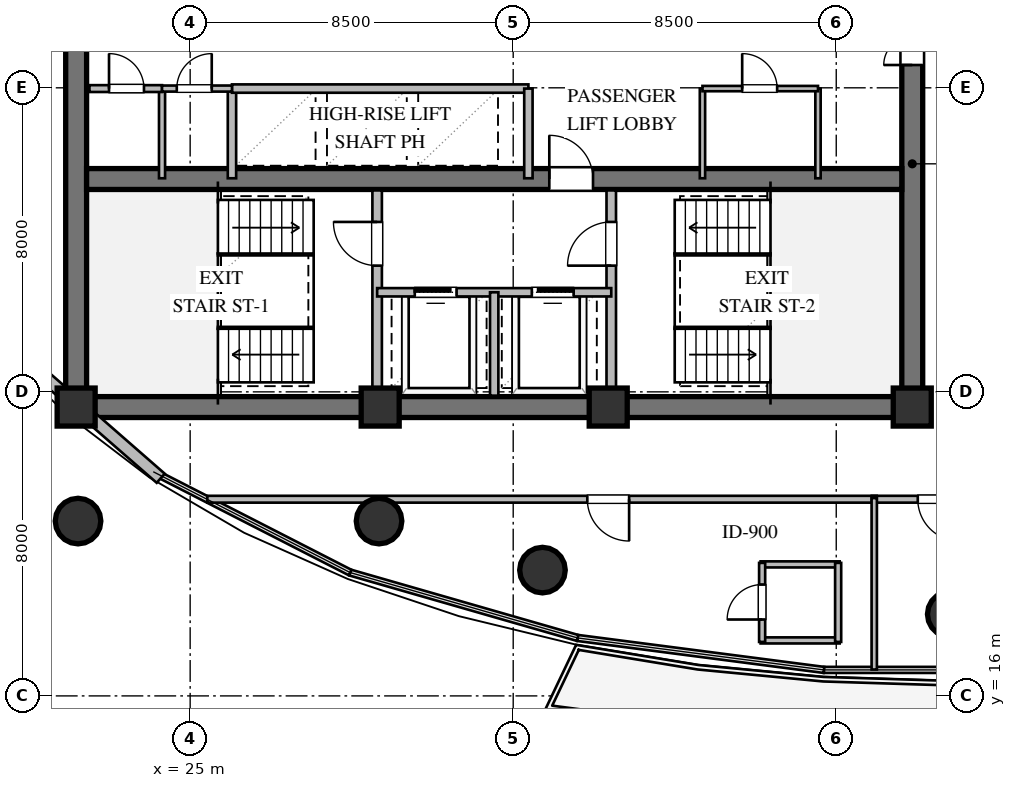
"""IFC4 building model, lengths in metres.
Left out: names, types, materials, properties, quantities, classifications, styles, units other than length and angle.
Written with IfcOpenShell. Run it as: python <this file> out.ifc"""

import sys

from ifc_helpers import new_model, si_unit, direction, frame, frame_2d, origin, origin_2d, place, context, subcontext, project, spatial, rectangle, circle, extrude, element, fill, save


model = new_model("IFC4")
c1 = context("Model", 3, precision=1e-05, world=origin(), true_north=direction((0.0, 1.0)))
c2 = subcontext(c1, "Body", "Model", "MODEL_VIEW")
j1 = project(units=[si_unit("LENGTHUNIT", "METRE"), si_unit("PLANEANGLEUNIT", "RADIAN")], contexts=[c1])
p1 = place(None, origin())
s1 = spatial("IfcSite", under=j1, at=p1, CompositionType="ELEMENT")
p2 = place(p1, origin())
s2 = spatial("IfcBuilding", under=s1, at=p2, CompositionType="ELEMENT")
p3 = place(p2, frame((0.0, 0.0, 124.2)))
s3 = spatial("IfcBuildingStorey", under=s2, at=p3, CompositionType="ELEMENT", Elevation=124.2)
p4 = place(p3, frame((21.725, 23.6, 0.0), z_axis=(0.0, 0.0, 1.0), x_axis=(1.0, 0.0, 0.0)))
e1 = element("IfcWall", 1, at=p4, inside=s3, PredefinedType="SHEAR", context=c2, shape_type="SweptSolid", body=[
    extrude(rectangle(XDim=22.55, YDim=0.55, at=frame_2d((11.275, 0.0))), origin(), (0.0, 0.0, 1.0), 3.36),
])
p5 = place(p3, frame((22.0, 23.875, 0.0), z_axis=(0.0, 0.0, 1.0), x_axis=(0.0, 1.0, 0.0)))
e2 = element("IfcWall", 2, at=p5, inside=s3, PredefinedType="SHEAR", context=c2, shape_type="SweptSolid", body=[
    extrude(rectangle(XDim=12.25, YDim=0.55, at=frame_2d((6.125, 0.0))), origin(), (0.0, 0.0, 1.0), 3.36),
])
p6 = place(p3, frame((44.0, 23.875, 0.0), z_axis=(0.0, 0.0, 1.0), x_axis=(0.0, 1.0, 0.0)))
e3 = element("IfcWall", 3, at=p6, inside=s3, PredefinedType="SHEAR", context=c2, shape_type="SweptSolid", body=[
    extrude(rectangle(XDim=12.25, YDim=0.55, at=frame_2d((6.125, 0.0))), origin(), (0.0, 0.0, 1.0), 3.36),
])
p7 = place(p6, frame((8.725, 0.0, 0.0)))
e4 = element("IfcOpeningElement", 4, at=p7, cuts=e3, PredefinedType="OPENING", context=c2, shape_type="SweptSolid", body=[
    extrude(rectangle(XDim=1.5, YDim=2.15, at=frame_2d((0.75, 1.075))), frame((0.0, 0.285, 0.0), z_axis=(0.0, -1.0, 0.0), x_axis=(1.0, 0.0, 0.0)), (0.0, 0.0, 1.0), 0.57),
])
p8 = place(p3, frame((22.275, 29.6, 0.0), z_axis=(0.0, 0.0, 1.0), x_axis=(1.0, 0.0, 0.0)))
e5 = element("IfcWall", 5, at=p8, inside=s3, PredefinedType="SHEAR", context=c2, shape_type="SweptSolid", body=[
    extrude(rectangle(XDim=21.45, YDim=0.55, at=frame_2d((10.725, 0.0))), origin(), (0.0, 0.0, 1.0), 3.36),
])
p9 = place(p8, frame((12.175, 0.0, 0.0)))
e6 = element("IfcOpeningElement", 6, at=p9, cuts=e5, PredefinedType="OPENING", context=c2, shape_type="SweptSolid", body=[
    extrude(rectangle(XDim=1.15, YDim=2.1, at=frame_2d((0.575, 1.05))), frame((0.0, 0.285, 0.0), z_axis=(0.0, -1.0, 0.0), x_axis=(1.0, 0.0, 0.0)), (0.0, 0.0, 1.0), 0.57),
])
for number, where, z_axis, x_axis in (
    (7, (22.0, 23.6, 0.0), (0.0, 0.0, 1.0), (1.0, 0.0, 0.0)),
    (8, (30.0, 23.6, 0.0), (0.0, 0.0, 1.0), (1.0, 0.0, 0.0)),
    (9, (36.0, 23.6, 0.0), (0.0, 0.0, 1.0), (1.0, 0.0, 0.0)),
    (10, (44.0, 23.6, 0.0), (0.0, 0.0, 1.0), (1.0, 0.0, 0.0)),
):
    element("IfcColumn", number, at=place(p3, frame(where, z_axis=z_axis, x_axis=x_axis)), inside=s3, PredefinedType="COLUMN", context=c2, shape_type="SweptSolid", body=[
        extrude(rectangle(XDim=1.0, YDim=1.0, at=origin_2d()), origin(), (0.0, 0.0, 1.0), 3.6),
    ])
for number, where, z_axis, x_axis in (
    (11, (22.05, 20.6, 0.0), (0.0, 0.0, 1.0), (1.0, 0.0, 0.0)),
    (12, (29.97, 20.6, 0.0), (0.0, 0.0, 1.0), (1.0, 0.0, 0.0)),
    (13, (34.27, 19.31, 0.0), (0.0, 0.0, 1.0), (1.0, 0.0, 0.0)),
    (14, (45.0, 18.15, 0.0), (0.0, 0.0, 1.0), (1.0, 0.0, 0.0)),
):
    element("IfcColumn", number, at=place(p3, frame(where, z_axis=z_axis, x_axis=x_axis)), inside=s3, PredefinedType="COLUMN", context=c2, shape_type="SweptSolid", body=[
        extrude(circle(Radius=0.6, at=origin_2d()), origin(), (0.0, 0.0, 1.0), 3.6),
    ])
p10 = place(p3, frame((24.225, 21.727, 0.0), z_axis=(0.0, 0.0, 1.0), x_axis=(-0.753105964003, 0.657899237713, 0.0)))
e15 = element("IfcWall", 15, at=p10, inside=s3, PredefinedType="STANDARD", context=c2, shape_type="SweptSolid", body=[
    extrude(rectangle(XDim=5.998, YDim=0.32, at=frame_2d((2.999, 0.0))), origin(), (0.0, 0.0, 1.0), 2.35),
])
p11 = place(p3, frame((29.92, 23.9, 0.0), z_axis=(0.0, 0.0, 1.0), x_axis=(0.0, 1.0, 0.0)))
e16 = element("IfcWall", 16, at=p11, inside=s3, PredefinedType="SOLIDWALL", context=c2, shape_type="SweptSolid", body=[
    extrude(rectangle(XDim=5.4, YDim=0.25, at=frame_2d((2.7, 0.0))), origin(), (0.0, 0.0, 1.0), 2.806),
])
p12 = place(p11, frame((3.421, 0.0, 0.0)))
e17 = element("IfcOpeningElement", 17, at=p12, cuts=e16, PredefinedType="OPENING", context=c2, shape_type="SweptSolid", body=[
    extrude(rectangle(XDim=1.15, YDim=2.1, at=frame_2d((0.575, 1.05))), frame((0.0, 0.135, 0.0), z_axis=(0.0, -1.0, 0.0), x_axis=(1.0, 0.0, 0.0)), (0.0, 0.0, 1.0), 0.27),
])
p13 = place(p3, frame((36.08, 23.9, 0.0), z_axis=(0.0, 0.0, 1.0), x_axis=(0.0, 1.0, 0.0)))
e18 = element("IfcWall", 18, at=p13, inside=s3, PredefinedType="SOLIDWALL", context=c2, shape_type="SweptSolid", body=[
    extrude(rectangle(XDim=5.4, YDim=0.25, at=frame_2d((2.7, 0.0))), origin(), (0.0, 0.0, 1.0), 3.36),
])
p14 = place(p13, frame((3.421, 0.0, 0.0)))
e19 = element("IfcOpeningElement", 19, at=p14, cuts=e18, PredefinedType="OPENING", context=c2, shape_type="SweptSolid", body=[
    extrude(rectangle(XDim=1.15, YDim=2.1, at=frame_2d((0.575, 1.05))), frame((0.0, 0.135, 0.0), z_axis=(0.0, -1.0, 0.0), x_axis=(1.0, 0.0, 0.0)), (0.0, 0.0, 1.0), 0.27),
])
p15 = place(p3, frame((29.92, 26.62, 0.0), z_axis=(0.0, 0.0, 1.0), x_axis=(1.0, 0.0, 0.0)))
e20 = element("IfcWall", 20, at=p15, inside=s3, PredefinedType="SOLIDWALL", context=c2, shape_type="SweptSolid", body=[
    extrude(rectangle(XDim=6.16, YDim=0.22, at=frame_2d((3.08, 0.0))), origin(), (0.0, 0.0, 1.0), 3.36),
])
p16 = place(p15, frame((0.99, 0.0, 0.0)))
e21 = element("IfcOpeningElement", 21, at=p16, cuts=e20, PredefinedType="OPENING", context=c2, shape_type="SweptSolid", body=[
    extrude(rectangle(XDim=1.1, YDim=2.1, at=frame_2d((0.55, 1.05))), frame((0.0, 0.12, 0.0), z_axis=(0.0, -1.0, 0.0), x_axis=(1.0, 0.0, 0.0)), (0.0, 0.0, 1.0), 0.24),
])
p17 = place(p15, frame((4.07, 0.0, 0.0)))
e22 = element("IfcOpeningElement", 22, at=p17, cuts=e20, PredefinedType="OPENING", context=c2, shape_type="SweptSolid", body=[
    extrude(rectangle(XDim=1.1, YDim=2.1, at=frame_2d((0.55, 1.05))), frame((0.0, 0.12, 0.0), z_axis=(0.0, -1.0, 0.0), x_axis=(1.0, 0.0, 0.0)), (0.0, 0.0, 1.0), 0.24),
])
p18 = place(p3, frame((33.0, 23.9, 0.0), z_axis=(0.0, 0.0, 1.0), x_axis=(0.0, 1.0, 0.0)))
e23 = element("IfcWall", 23, at=p18, inside=s3, PredefinedType="SOLIDWALL", context=c2, shape_type="SweptSolid", body=[
    extrude(rectangle(XDim=2.72, YDim=0.22, at=frame_2d((1.36, 0.0))), origin(), (0.0, 0.0, 1.0), 3.36),
])
p19 = place(p3, frame((26.1, 29.62, 0.0), z_axis=(0.0, 0.0, 1.0), x_axis=(0.0, 1.0, 0.0)))
e24 = element("IfcWall", 24, at=p19, inside=s3, PredefinedType="SOLIDWALL", context=c2, shape_type="SweptSolid", body=[
    extrude(rectangle(XDim=2.36, YDim=0.22, at=frame_2d((1.18, 0.0))), origin(), (0.0, 0.0, 1.0), 3.36),
])
p20 = place(p3, frame((26.1, 31.98, 0.0), z_axis=(0.0, 0.0, 1.0), x_axis=(1.0, 0.0, 0.0)))
e25 = element("IfcWall", 25, at=p20, inside=s3, PredefinedType="SOLIDWALL", context=c2, shape_type="SweptSolid", body=[
    extrude(rectangle(XDim=7.8, YDim=0.22, at=frame_2d((3.9, 0.0))), origin(), (0.0, 0.0, 1.0), 3.36),
])
p21 = place(p3, frame((33.9, 29.62, 0.0), z_axis=(0.0, 0.0, 1.0), x_axis=(0.0, 1.0, 0.0)))
e26 = element("IfcWall", 26, at=p21, inside=s3, PredefinedType="SOLIDWALL", context=c2, shape_type="SweptSolid", body=[
    extrude(rectangle(XDim=2.36, YDim=0.22, at=frame_2d((1.18, 0.0))), origin(), (0.0, 0.0, 1.0), 3.36),
])
p22 = place(p3, frame((24.26, 29.62, 0.0), z_axis=(0.0, 0.0, 1.0), x_axis=(0.0, 1.0, 0.0)))
e27 = element("IfcWall", 27, at=p22, inside=s3, PredefinedType="PLUMBINGWALL", context=c2, shape_type="SweptSolid", body=[
    extrude(rectangle(XDim=2.36, YDim=0.16, at=frame_2d((1.18, 0.0))), origin(), (0.0, 0.0, 1.0), 3.36),
])
p23 = place(p3, frame((22.35, 31.98, 0.0), z_axis=(0.0, 0.0, 1.0), x_axis=(1.0, 0.0, 0.0)))
e28 = element("IfcWall", 28, at=p23, inside=s3, PredefinedType="PARTITIONING", context=c2, shape_type="SweptSolid", body=[
    extrude(rectangle(XDim=1.91, YDim=0.18, at=frame_2d((0.955, 0.0))), origin(), (0.0, 0.0, 1.0), 3.36),
])
p24 = place(p23, frame((0.515, 0.0, 0.0)))
e29 = element("IfcOpeningElement", 29, at=p24, cuts=e28, PredefinedType="OPENING", context=c2, shape_type="SweptSolid", body=[
    extrude(rectangle(XDim=0.92, YDim=2.1, at=frame_2d((0.46, 1.05))), frame((0.0, 0.1, 0.0), z_axis=(0.0, -1.0, 0.0), x_axis=(1.0, 0.0, 0.0)), (0.0, 0.0, 1.0), 0.2),
])
p25 = place(p3, frame((24.26, 31.98, 0.0), z_axis=(0.0, 0.0, 1.0), x_axis=(1.0, 0.0, 0.0)))
e30 = element("IfcWall", 30, at=p25, inside=s3, PredefinedType="PLUMBINGWALL", context=c2, shape_type="SweptSolid", body=[
    extrude(rectangle(XDim=1.84, YDim=0.16, at=frame_2d((0.92, 0.0))), origin(), (0.0, 0.0, 1.0), 3.36),
])
p26 = place(p25, frame((0.388, 0.0, 0.0)))
e31 = element("IfcOpeningElement", 31, at=p26, cuts=e30, PredefinedType="OPENING", context=c2, shape_type="SweptSolid", body=[
    extrude(rectangle(XDim=0.92, YDim=2.1, at=frame_2d((0.46, 1.05))), frame((0.0, 0.09, 0.0), z_axis=(0.0, -1.0, 0.0), x_axis=(1.0, 0.0, 0.0)), (0.0, 0.0, 1.0), 0.18),
])
for number, where, z_axis, x_axis in (
    (32, (38.48, 29.62, 0.0), (0.0, 0.0, 1.0), (0.0, 1.0, 0.0)),
    (33, (41.52, 29.62, 0.0), (0.0, 0.0, 1.0), (0.0, 1.0, 0.0)),
):
    element("IfcWall", number, at=place(p3, frame(where, z_axis=z_axis, x_axis=x_axis)), inside=s3, PredefinedType="PARTITIONING", context=c2, shape_type="SweptSolid", body=[
        extrude(rectangle(XDim=2.36, YDim=0.14, at=frame_2d((1.18, 0.0))), origin(), (0.0, 0.0, 1.0), 3.36),
    ])
p27 = place(p3, frame((38.48, 31.98, 0.0), z_axis=(0.0, 0.0, 1.0), x_axis=(1.0, 0.0, 0.0)))
e34 = element("IfcWall", 34, at=p27, inside=s3, PredefinedType="PARTITIONING", context=c2, shape_type="SweptSolid", body=[
    extrude(rectangle(XDim=3.04, YDim=0.14, at=frame_2d((1.52, 0.0))), origin(), (0.0, 0.0, 1.0), 3.36),
])
p28 = place(p27, frame((1.045, 0.0, 0.0)))
e35 = element("IfcOpeningElement", 35, at=p28, cuts=e34, PredefinedType="OPENING", context=c2, shape_type="SweptSolid", body=[
    extrude(rectangle(XDim=0.92, YDim=2.1, at=frame_2d((0.46, 1.05))), frame((0.0, 0.08, 0.0), z_axis=(0.0, -1.0, 0.0), x_axis=(1.0, 0.0, 0.0)), (0.0, 0.0, 1.0), 0.16),
])
for number, where, z_axis, x_axis in (
    (36, (40.01, 17.46, 0.0), (0.0, 0.0, 1.0), (1.0, 0.0, 0.0)),
    (37, (40.01, 19.46, 0.0), (0.0, 0.0, 1.0), (1.0, 0.0, 0.0)),
):
    element("IfcWall", number, at=place(p3, frame(where, z_axis=z_axis, x_axis=x_axis)), inside=s3, PredefinedType="PLUMBINGWALL", context=c2, shape_type="SweptSolid", body=[
        extrude(rectangle(XDim=2.08, YDim=0.16, at=frame_2d((1.04, 0.0))), origin(), (0.0, 0.0, 1.0), 3.36),
    ])
p29 = place(p3, frame((40.05, 17.42, 0.0), z_axis=(0.0, 0.0, 1.0), x_axis=(0.0, 1.0, 0.0)))
e38 = element("IfcWall", 38, at=p29, inside=s3, PredefinedType="PLUMBINGWALL", context=c2, shape_type="SweptSolid", body=[
    extrude(rectangle(XDim=2.08, YDim=0.16, at=frame_2d((1.04, 0.0))), origin(), (0.0, 0.0, 1.0), 3.36),
])
p30 = place(p29, frame((0.59, 0.0, 0.0)))
e39 = element("IfcOpeningElement", 39, at=p30, cuts=e38, PredefinedType="OPENING", context=c2, shape_type="SweptSolid", body=[
    extrude(rectangle(XDim=0.92, YDim=2.1, at=frame_2d((0.46, 1.05))), frame((0.0, 0.09, 0.0), z_axis=(0.0, -1.0, 0.0), x_axis=(1.0, 0.0, 0.0)), (0.0, 0.0, 1.0), 0.18),
])
p31 = place(p3, frame((42.05, 17.42, 0.0), z_axis=(0.0, 0.0, 1.0), x_axis=(0.0, 1.0, 0.0)))
e40 = element("IfcWall", 40, at=p31, inside=s3, PredefinedType="PLUMBINGWALL", context=c2, shape_type="SweptSolid", body=[
    extrude(rectangle(XDim=2.08, YDim=0.16, at=frame_2d((1.04, 0.0))), origin(), (0.0, 0.0, 1.0), 3.36),
])
p32 = place(p3, frame((43.065, 21.175, 0.0), z_axis=(0.0, 0.0, 1.0), x_axis=(-1.0, 0.0, 0.0)))
e41 = element("IfcWall", 41, at=p32, inside=s3, PredefinedType="PARTITIONING", context=c2, shape_type="SweptSolid", body=[
    extrude(rectangle(XDim=17.614, YDim=0.18, at=frame_2d((8.807, 0.0))), origin(), (0.0, 0.0, 1.0), 2.657),
])
p33 = place(p32, frame((6.515, 0.0, 0.0)))
e42 = element("IfcOpeningElement", 42, at=p33, cuts=e41, PredefinedType="OPENING", context=c2, shape_type="SweptSolid", body=[
    extrude(rectangle(XDim=1.1, YDim=2.1, at=frame_2d((0.55, 1.05))), frame((0.0, 0.1, 0.0), z_axis=(0.0, -1.0, 0.0), x_axis=(1.0, 0.0, 0.0)), (0.0, 0.0, 1.0), 0.2),
])
p34 = place(p3, frame((46.455, 21.175, 0.0), z_axis=(0.0, 0.0, 1.0), x_axis=(-1.0, 0.0, 0.0)))
e43 = element("IfcWall", 43, at=p34, inside=s3, PredefinedType="PARTITIONING", context=c2, shape_type="SweptSolid", body=[
    extrude(rectangle(XDim=3.52, YDim=0.18, at=frame_2d((1.76, 0.0))), origin(), (0.0, 0.0, 1.0), 2.996),
])
p35 = place(p34, frame((1.21, 0.0, 0.0)))
e44 = element("IfcOpeningElement", 44, at=p35, cuts=e43, PredefinedType="OPENING", context=c2, shape_type="SweptSolid", body=[
    extrude(rectangle(XDim=1.1, YDim=2.1, at=frame_2d((0.55, 1.05))), frame((0.0, 0.1, 0.0), z_axis=(0.0, -1.0, 0.0), x_axis=(1.0, 0.0, 0.0)), (0.0, 0.0, 1.0), 0.2),
])
p36 = place(p3, frame((43.0, 21.205, 0.0), z_axis=(0.0, 0.0, 1.0), x_axis=(0.0, -1.0, 0.0)))
e45 = element("IfcWall", 45, at=p36, inside=s3, PredefinedType="PARTITIONING", context=c2, shape_type="SweptSolid", body=[
    extrude(rectangle(XDim=4.511, YDim=0.14, at=frame_2d((2.255, 0.0))), origin(), (0.0, 0.0, 1.0), 3.36),
])
p37 = place(p12, origin())
e46 = element("IfcDoor", 46, at=p37, inside=s3, OperationType="SINGLE_SWING_RIGHT", PredefinedType="DOOR", context=c2, shape_type="SweptSolid", body=[
    extrude(rectangle(XDim=1.15, YDim=2.1, at=frame_2d((0.575, 1.05))), frame((0.0, 0.025, 0.0), z_axis=(0.0, -1.0, 0.0), x_axis=(1.0, 0.0, 0.0)), (0.0, 0.0, 1.0), 0.05),
])
fill(e17, e46)
p38 = place(p14, origin())
e47 = element("IfcDoor", 47, at=p38, inside=s3, OperationType="SINGLE_SWING_LEFT", PredefinedType="DOOR", context=c2, shape_type="SweptSolid", body=[
    extrude(rectangle(XDim=1.15, YDim=2.1, at=frame_2d((0.575, 1.05))), frame((0.0, 0.025, 0.0), z_axis=(0.0, -1.0, 0.0), x_axis=(1.0, 0.0, 0.0)), (0.0, 0.0, 1.0), 0.05),
])
fill(e19, e47)
p39 = place(p16, origin())
e48 = element("IfcDoor", 48, at=p39, inside=s3, OperationType="SLIDING_TO_LEFT", PredefinedType="DOOR", context=c2, shape_type="SweptSolid", body=[
    extrude(rectangle(XDim=1.1, YDim=2.1, at=frame_2d((0.55, 1.05))), frame((0.0, 0.025, 0.0), z_axis=(0.0, -1.0, 0.0), x_axis=(1.0, 0.0, 0.0)), (0.0, 0.0, 1.0), 0.05),
])
fill(e21, e48)
p40 = place(p17, origin())
e49 = element("IfcDoor", 49, at=p40, inside=s3, OperationType="SLIDING_TO_RIGHT", PredefinedType="DOOR", context=c2, shape_type="SweptSolid", body=[
    extrude(rectangle(XDim=1.1, YDim=2.1, at=frame_2d((0.55, 1.05))), frame((0.0, 0.025, 0.0), z_axis=(0.0, -1.0, 0.0), x_axis=(1.0, 0.0, 0.0)), (0.0, 0.0, 1.0), 0.05),
])
fill(e22, e49)
p41 = place(p9, origin())
e50 = element("IfcDoor", 50, at=p41, inside=s3, OperationType="SINGLE_SWING_LEFT", PredefinedType="DOOR", context=c2, shape_type="SweptSolid", body=[
    extrude(rectangle(XDim=1.15, YDim=2.1, at=frame_2d((0.575, 1.05))), frame((0.0, 0.025, 0.0), z_axis=(0.0, -1.0, 0.0), x_axis=(1.0, 0.0, 0.0)), (0.0, 0.0, 1.0), 0.05),
])
fill(e6, e50)
p42 = place(p7, origin())
e51 = element("IfcDoor", 51, at=p42, inside=s3, OperationType="DOUBLE_DOOR_SINGLE_SWING", PredefinedType="DOOR", context=c2, shape_type="SweptSolid", body=[
    extrude(rectangle(XDim=1.5, YDim=2.15, at=frame_2d((0.75, 1.075))), frame((0.0, 0.025, 0.0), z_axis=(0.0, -1.0, 0.0), x_axis=(1.0, 0.0, 0.0)), (0.0, 0.0, 1.0), 0.05),
])
fill(e4, e51)
p43 = place(p24, origin())
e52 = element("IfcDoor", 52, at=p43, inside=s3, OperationType="SINGLE_SWING_LEFT", PredefinedType="DOOR", context=c2, shape_type="SweptSolid", body=[
    extrude(rectangle(XDim=0.92, YDim=2.1, at=frame_2d((0.46, 1.05))), frame((0.0, 0.025, 0.0), z_axis=(0.0, -1.0, 0.0), x_axis=(1.0, 0.0, 0.0)), (0.0, 0.0, 1.0), 0.05),
])
fill(e29, e52)
p44 = place(p26, origin())
e53 = element("IfcDoor", 53, at=p44, inside=s3, OperationType="SINGLE_SWING_RIGHT", PredefinedType="DOOR", context=c2, shape_type="SweptSolid", body=[
    extrude(rectangle(XDim=0.92, YDim=2.1, at=frame_2d((0.46, 1.05))), frame((0.0, 0.025, 0.0), z_axis=(0.0, -1.0, 0.0), x_axis=(1.0, 0.0, 0.0)), (0.0, 0.0, 1.0), 0.05),
])
fill(e31, e53)
p45 = place(p28, origin())
e54 = element("IfcDoor", 54, at=p45, inside=s3, OperationType="SINGLE_SWING_LEFT", PredefinedType="DOOR", context=c2, shape_type="SweptSolid", body=[
    extrude(rectangle(XDim=0.92, YDim=2.1, at=frame_2d((0.46, 1.05))), frame((0.0, 0.025, 0.0), z_axis=(0.0, -1.0, 0.0), x_axis=(1.0, 0.0, 0.0)), (0.0, 0.0, 1.0), 0.05),
])
fill(e35, e54)
p46 = place(p30, origin())
e55 = element("IfcDoor", 55, at=p46, inside=s3, OperationType="SINGLE_SWING_LEFT", PredefinedType="DOOR", context=c2, shape_type="SweptSolid", body=[
    extrude(rectangle(XDim=0.92, YDim=2.1, at=frame_2d((0.46, 1.05))), frame((0.0, 0.025, 0.0), z_axis=(0.0, -1.0, 0.0), x_axis=(1.0, 0.0, 0.0)), (0.0, 0.0, 1.0), 0.05),
])
fill(e39, e55)
p47 = place(p33, origin())
e56 = element("IfcDoor", 56, at=p47, inside=s3, OperationType="SINGLE_SWING_LEFT", PredefinedType="DOOR", context=c2, shape_type="SweptSolid", body=[
    extrude(rectangle(XDim=1.1, YDim=2.1, at=frame_2d((0.55, 1.05))), frame((0.0, 0.025, 0.0), z_axis=(0.0, -1.0, 0.0), x_axis=(1.0, 0.0, 0.0)), (0.0, 0.0, 1.0), 0.05),
])
fill(e42, e56)
p48 = place(p35, origin())
e57 = element("IfcDoor", 57, at=p48, inside=s3, OperationType="SINGLE_SWING_LEFT", PredefinedType="DOOR", context=c2, shape_type="SweptSolid", body=[
    extrude(rectangle(XDim=1.1, YDim=2.1, at=frame_2d((0.55, 1.05))), frame((0.0, 0.025, 0.0), z_axis=(0.0, -1.0, 0.0), x_axis=(1.0, 0.0, 0.0)), (0.0, 0.0, 1.0), 0.05),
])
fill(e44, e57)
save(model, sys.argv[1])
